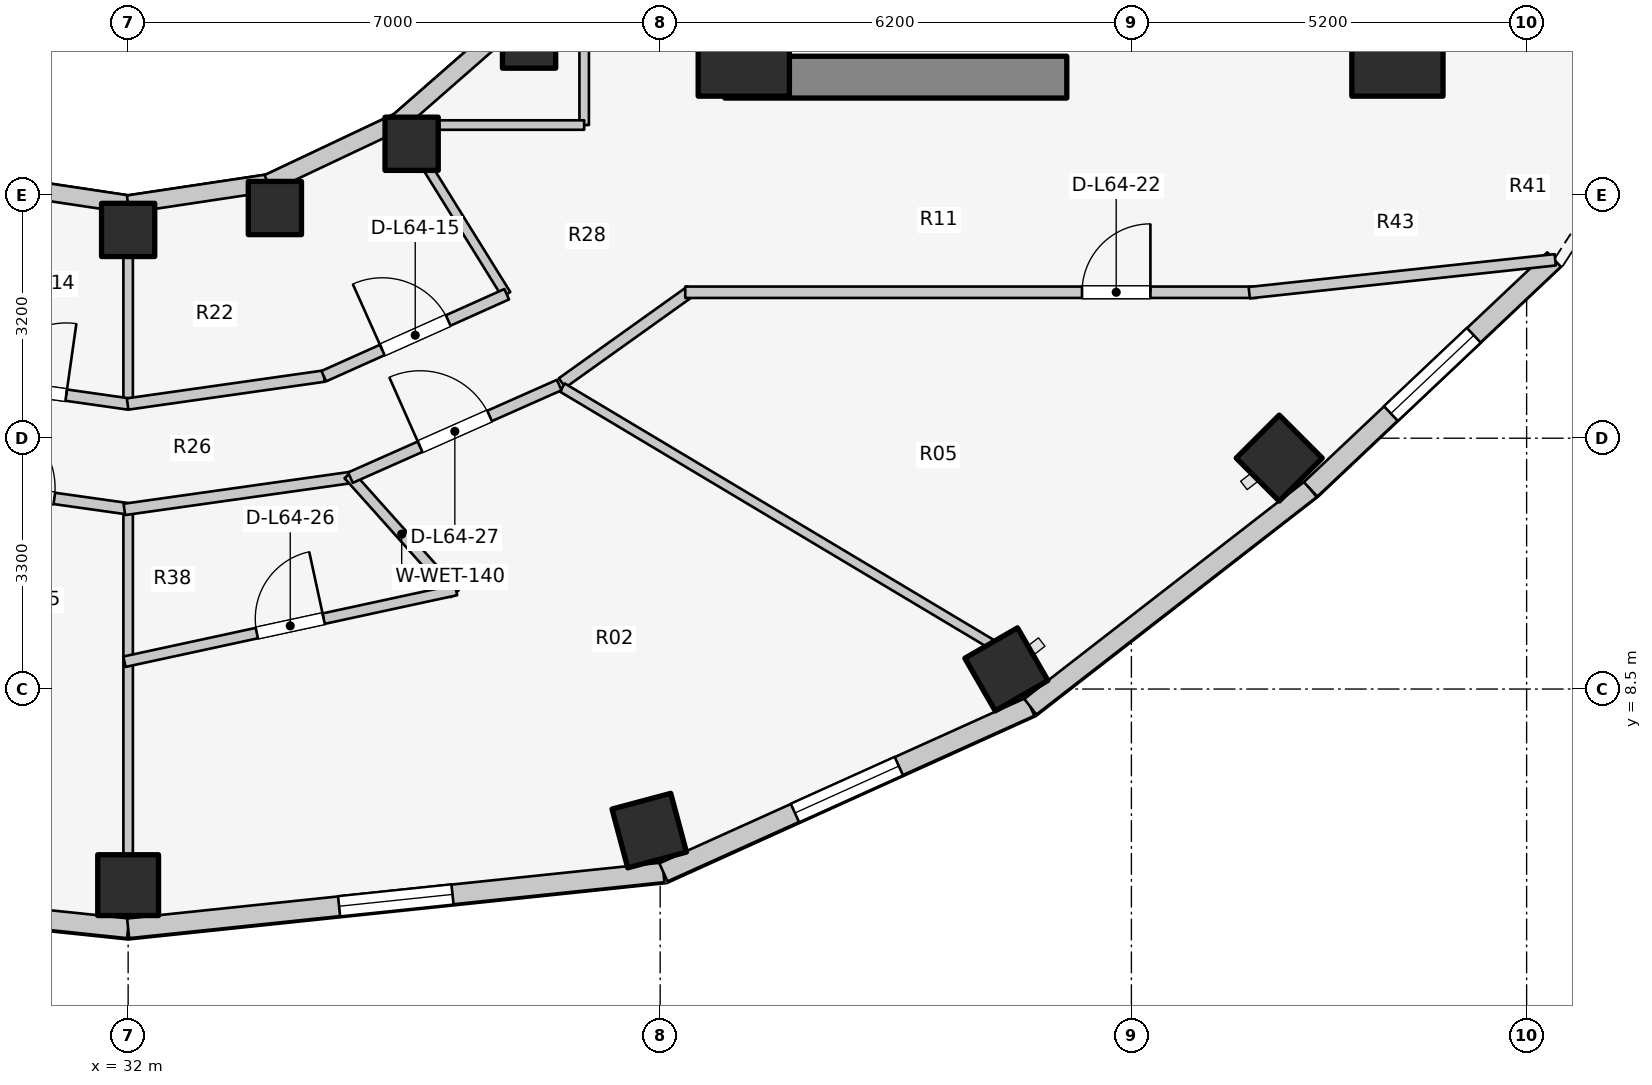
"""IFC4 building model, lengths in metres.
Left out: names, types, materials, properties, quantities, classifications, styles, units other than length and angle.
Written with IfcOpenShell. Run it as: python <this file> out.ifc"""

import sys

from ifc_helpers import new_model, si_unit, direction, frame, frame_2d, origin, origin_2d, place, context, subcontext, project, spatial, rectangle, extrude, element, fill, save


model = new_model("IFC4")
c1 = context("Model", 3, precision=1e-05, world=origin(), true_north=direction((0.0, 1.0)))
c2 = subcontext(c1, "Body", "Model", "MODEL_VIEW")
j1 = project(units=[si_unit("LENGTHUNIT", "METRE"), si_unit("PLANEANGLEUNIT", "RADIAN")], contexts=[c1])
p1 = place(None, origin())
s1 = spatial("IfcSite", under=j1, at=p1, CompositionType="ELEMENT")
p2 = place(p1, origin())
s2 = spatial("IfcBuilding", under=s1, at=p2, CompositionType="ELEMENT")
p3 = place(p2, frame((0.0, 0.0, 210.9)))
s3 = spatial("IfcBuildingStorey", under=s2, at=p3, CompositionType="ELEMENT", Elevation=210.9)
p4 = place(p3, frame((39.85, 16.55, 0.0), z_axis=(0.0, 0.0, 1.0), x_axis=(1.0, 0.0, 0.0)))
e1 = element("IfcWall", 1, at=p4, inside=s3, PredefinedType="SHEAR", context=c2, shape_type="SweptSolid", body=[
    extrude(rectangle(XDim=4.5, YDim=0.55, at=frame_2d((2.25, 0.0))), origin(), (0.0, 0.0, 1.0), 3.1),
])
for number, where, z_axis, x_axis in (
    (2, (40.1, 16.9, 0.0), (0.0, 0.0, 1.0), (1.0, 0.0, 0.0)),
    (3, (48.7, 16.9, 0.0), (0.0, 0.0, 1.0), (1.0, 0.0, 0.0)),
):
    element("IfcColumn", number, at=place(p3, frame(where, z_axis=z_axis, x_axis=x_axis)), inside=s3, PredefinedType="COLUMN", context=c2, shape_type="SweptSolid", body=[
        extrude(rectangle(XDim=1.2, YDim=1.2, at=origin_2d()), origin(), (0.0, 0.0, 1.0), 3.1),
    ])
p5 = place(p3, frame((32.0, 14.54, 0.0), z_axis=(0.0, 0.0, 1.0), x_axis=(1.0, 0.0, 0.0)))
e4 = element("IfcColumn", 4, at=p5, inside=s3, PredefinedType="COLUMN", context=c2, shape_type="SweptSolid", body=[
    extrude(rectangle(XDim=0.7, YDim=0.7, at=origin_2d()), origin(), (0.0, 0.0, 1.0), 3.1),
])
p6 = place(p3, frame((32.0, 5.92, 0.0), z_axis=(0.0, 0.0, 1.0), x_axis=(0.0, -1.0, 0.0)))
e5 = element("IfcColumn", 5, at=p6, inside=s3, PredefinedType="COLUMN", context=c2, shape_type="SweptSolid", body=[
    extrude(rectangle(XDim=0.8, YDim=0.8, at=origin_2d()), origin(), (0.0, 0.0, 1.0), 3.1),
])
p7 = place(p3, frame((33.931, 14.828, 0.0), z_axis=(0.0, 0.0, 1.0), x_axis=(1.0, 0.0, 0.0)))
e6 = element("IfcColumn", 6, at=p7, inside=s3, PredefinedType="COLUMN", context=c2, shape_type="SweptSolid", body=[
    extrude(rectangle(XDim=0.7, YDim=0.7, at=origin_2d()), origin(), (0.0, 0.0, 1.0), 3.1),
])
p8 = place(p3, frame((38.856, 6.638, 0.0), z_axis=(0.0, 0.0, 1.0), x_axis=(0.258819045103, -0.965925826289, 0.0)))
e7 = element("IfcColumn", 7, at=p8, inside=s3, PredefinedType="COLUMN", context=c2, shape_type="SweptSolid", body=[
    extrude(rectangle(XDim=0.8, YDim=0.8, at=origin_2d()), origin(), (0.0, 0.0, 1.0), 3.1),
])
p9 = place(p3, frame((35.73, 15.673, 0.0), z_axis=(0.0, 0.0, 1.0), x_axis=(1.0, 0.0, 0.0)))
e8 = element("IfcColumn", 8, at=p9, inside=s3, PredefinedType="COLUMN", context=c2, shape_type="SweptSolid", body=[
    extrude(rectangle(XDim=0.7, YDim=0.7, at=origin_2d()), origin(), (0.0, 0.0, 1.0), 3.1),
])
p10 = place(p3, frame((43.555, 8.759, 0.0), z_axis=(0.0, 0.0, 1.0), x_axis=(0.5, -0.866025403784, 0.0)))
e9 = element("IfcColumn", 9, at=p10, inside=s3, PredefinedType="COLUMN", context=c2, shape_type="SweptSolid", body=[
    extrude(rectangle(XDim=0.8, YDim=0.8, at=origin_2d()), origin(), (0.0, 0.0, 1.0), 3.1),
])
p11 = place(p3, frame((37.275, 17.018, 0.0), z_axis=(0.0, 0.0, 1.0), x_axis=(1.0, 0.0, 0.0)))
e10 = element("IfcColumn", 10, at=p11, inside=s3, PredefinedType="COLUMN", context=c2, shape_type="SweptSolid", body=[
    extrude(rectangle(XDim=0.7, YDim=0.7, at=origin_2d()), origin(), (0.0, 0.0, 1.0), 3.1),
])
p12 = place(p3, frame((47.145, 11.538, 0.0), z_axis=(0.0, 0.0, 1.0), x_axis=(0.707106781187, -0.707106781187, 0.0)))
e11 = element("IfcColumn", 11, at=p12, inside=s3, PredefinedType="COLUMN", context=c2, shape_type="SweptSolid", body=[
    extrude(rectangle(XDim=0.8, YDim=0.8, at=origin_2d()), origin(), (0.0, 0.0, 1.0), 3.1),
])
for number, where, z_axis, x_axis in (
    (12, (30.157, 15.157, 0.0), (0.0, 0.0, 1.0), (0.989, -0.149, 0.0)),
    (13, (32.0, 14.88, 0.0), (0.0, 0.0, 1.0), (0.989, 0.149, 0.0)),
):
    element("IfcWall", number, at=place(p3, frame(where, z_axis=z_axis, x_axis=x_axis)), inside=s3, PredefinedType="STANDARD", context=c2, shape_type="SweptSolid", body=[
        extrude(rectangle(XDim=1.864, YDim=0.23, at=frame_2d((0.932, 0.0))), origin(), (0.0, 0.0, 1.0), 2.16),
    ])
p13 = place(p3, frame((33.843, 15.157, 0.0), z_axis=(0.0, 0.0, 1.0), x_axis=(0.904179699603, 0.427152280606, 0.0)))
e14 = element("IfcWall", 14, at=p13, inside=s3, PredefinedType="STANDARD", context=c2, shape_type="SweptSolid", body=[
    extrude(rectangle(XDim=1.899, YDim=0.23, at=frame_2d((0.95, 0.0))), origin(), (0.0, 0.0, 1.0), 2.16),
])
p14 = place(p3, frame((35.56, 15.968, 0.0), z_axis=(0.0, 0.0, 1.0), x_axis=(0.752576694707, 0.658504607869, 0.0)))
e15 = element("IfcWall", 15, at=p14, inside=s3, PredefinedType="STANDARD", context=c2, shape_type="SweptSolid", body=[
    extrude(rectangle(XDim=1.959, YDim=0.23, at=frame_2d((0.98, 0.0))), origin(), (0.0, 0.0, 1.0), 2.16),
])
p15 = place(p3, frame((24.957, 6.088, 0.0), z_axis=(0.0, 0.0, 1.0), x_axis=(0.994582822721, -0.103947144014, 0.0)))
e16 = element("IfcWall", 16, at=p15, inside=s3, PredefinedType="STANDARD", context=c2, shape_type="SweptSolid", body=[
    extrude(rectangle(XDim=7.081, YDim=0.26, at=frame_2d((3.541, 0.0))), origin(), (0.0, 0.0, 1.0), 2.85),
])
p16 = place(p15, frame((2.341, 0.0, 0.75)))
e17 = element("IfcOpeningElement", 17, at=p16, cuts=e16, PredefinedType="OPENING", context=c2, shape_type="SweptSolid", body=[
    extrude(rectangle(XDim=2.4, YDim=1.7, at=frame_2d((1.2, 0.85))), frame((0.0, 0.14, 0.0), z_axis=(0.0, -1.0, 0.0), x_axis=(1.0, 0.0, 0.0)), (0.0, 0.0, 1.0), 0.28),
])
p17 = place(p3, frame((32.0, 5.352, 0.0), z_axis=(0.0, 0.0, 1.0), x_axis=(0.994582822721, 0.103947144014, 0.0)))
e18 = element("IfcWall", 18, at=p17, inside=s3, PredefinedType="STANDARD", context=c2, shape_type="SweptSolid", body=[
    extrude(rectangle(XDim=7.081, YDim=0.26, at=frame_2d((3.541, 0.0))), origin(), (0.0, 0.0, 1.0), 2.85),
])
p18 = place(p17, frame((2.791, 0.0, 0.75)))
e19 = element("IfcOpeningElement", 19, at=p18, cuts=e18, PredefinedType="OPENING", context=c2, shape_type="SweptSolid", body=[
    extrude(rectangle(XDim=1.5, YDim=1.6, at=frame_2d((0.75, 0.8))), frame((0.0, 0.14, 0.0), z_axis=(0.0, -1.0, 0.0), x_axis=(1.0, 0.0, 0.0)), (0.0, 0.0, 1.0), 0.28),
])
p19 = place(p3, frame((39.043, 6.088, 0.0), z_axis=(0.0, 0.0, 1.0), x_axis=(0.911427484938, 0.411460738952, 0.0)))
e20 = element("IfcWall", 20, at=p19, inside=s3, PredefinedType="STANDARD", context=c2, shape_type="SweptSolid", body=[
    extrude(rectangle(XDim=5.296, YDim=0.26, at=frame_2d((2.648, 0.0))), origin(), (0.0, 0.0, 1.0), 2.85),
])
p20 = place(p19, frame((1.898, 0.0, 0.75)))
e21 = element("IfcOpeningElement", 21, at=p20, cuts=e20, PredefinedType="OPENING", context=c2, shape_type="SweptSolid", body=[
    extrude(rectangle(XDim=1.5, YDim=1.6, at=frame_2d((0.75, 0.8))), frame((0.0, 0.14, 0.0), z_axis=(0.0, -1.0, 0.0), x_axis=(1.0, 0.0, 0.0)), (0.0, 0.0, 1.0), 0.28),
])
p21 = place(p3, frame((43.87, 8.267, 0.0), z_axis=(0.0, 0.0, 1.0), x_axis=(0.790126214723, 0.612944177563, 0.0)))
e22 = element("IfcWall", 22, at=p21, inside=s3, PredefinedType="STANDARD", context=c2, shape_type="SweptSolid", body=[
    extrude(rectangle(XDim=4.667, YDim=0.26, at=frame_2d((2.333, 0.0))), origin(), (0.0, 0.0, 1.0), 2.85),
])
p22 = place(p3, frame((47.558, 11.128, 0.0), z_axis=(0.0, 0.0, 1.0), x_axis=(0.72731899451, 0.686299555752, 0.0)))
e23 = element("IfcWall", 23, at=p22, inside=s3, PredefinedType="STANDARD", context=c2, shape_type="SweptSolid", body=[
    extrude(rectangle(XDim=4.404, YDim=0.26, at=frame_2d((2.202, 0.0))), origin(), (0.0, 0.0, 1.0), 2.85),
])
p23 = place(p22, frame((1.452, 0.0, 0.75)))
e24 = element("IfcOpeningElement", 24, at=p23, cuts=e23, PredefinedType="OPENING", context=c2, shape_type="SweptSolid", body=[
    extrude(rectangle(XDim=1.5, YDim=1.6, at=frame_2d((0.75, 0.8))), frame((0.0, 0.14, 0.0), z_axis=(0.0, -1.0, 0.0), x_axis=(1.0, 0.0, 0.0)), (0.0, 0.0, 1.0), 0.28),
])
p24 = place(p3, frame((32.0, 14.9, 0.0), z_axis=(0.0, 0.0, 1.0), x_axis=(0.0, -1.0, 0.0)))
e25 = element("IfcWall", 25, at=p24, inside=s3, PredefinedType="PARTITIONING", context=c2, shape_type="SweptSolid", body=[
    extrude(rectangle(XDim=2.65, YDim=0.125, at=frame_2d((1.325, 0.0))), origin(), (0.0, 0.0, 1.0), 2.376),
])
p25 = place(p3, frame((35.55, 15.985, 0.0), z_axis=(0.0, 0.0, 1.0), x_axis=(0.527527080983, -0.849538215049, 0.0)))
e26 = element("IfcWall", 26, at=p25, inside=s3, PredefinedType="PARTITIONING", context=c2, shape_type="SweptSolid", body=[
    extrude(rectangle(XDim=2.701, YDim=0.125, at=frame_2d((1.351, 0.0))), origin(), (0.0, 0.0, 1.0), 2.376),
])
p26 = place(p3, frame((29.423, 12.617, 0.0), z_axis=(0.0, 0.0, 1.0), x_axis=(0.990078185178, -0.140517569133, 0.0)))
e27 = element("IfcWall", 27, at=p26, inside=s3, PredefinedType="PARTITIONING", context=c2, shape_type="SweptSolid", body=[
    extrude(rectangle(XDim=2.61, YDim=0.15, at=frame_2d((1.305, 0.0))), origin(), (0.0, 0.0, 1.0), 2.376),
])
p27 = place(p26, frame((0.83, 0.0, 0.0)))
e28 = element("IfcOpeningElement", 28, at=p27, cuts=e27, PredefinedType="OPENING", context=c2, shape_type="SweptSolid", body=[
    extrude(rectangle(XDim=0.95, YDim=2.1, at=frame_2d((0.475, 1.05))), frame((0.0, 0.085, 0.0), z_axis=(0.0, -1.0, 0.0), x_axis=(1.0, 0.0, 0.0)), (0.0, 0.0, 1.0), 0.17),
])
p28 = place(p3, frame((31.993, 12.25, 0.0), z_axis=(0.0, 0.0, 1.0), x_axis=(0.990078185178, 0.140517569133, 0.0)))
e29 = element("IfcWall", 29, at=p28, inside=s3, PredefinedType="PARTITIONING", context=c2, shape_type="SweptSolid", body=[
    extrude(rectangle(XDim=2.61, YDim=0.15, at=frame_2d((1.305, 0.0))), origin(), (0.0, 0.0, 1.0), 2.376),
])
p29 = place(p3, frame((34.573, 12.616, 0.0), z_axis=(0.0, 0.0, 1.0), x_axis=(0.912628408652, 0.408790151203, 0.0)))
e30 = element("IfcWall", 30, at=p29, inside=s3, PredefinedType="PARTITIONING", context=c2, shape_type="SweptSolid", body=[
    extrude(rectangle(XDim=2.638, YDim=0.15, at=frame_2d((1.319, 0.0))), origin(), (0.0, 0.0, 1.0), 2.376),
])
p30 = place(p29, frame((0.844, 0.0, 0.0)))
e31 = element("IfcOpeningElement", 31, at=p30, cuts=e30, PredefinedType="OPENING", context=c2, shape_type="SweptSolid", body=[
    extrude(rectangle(XDim=0.95, YDim=2.1, at=frame_2d((0.475, 1.05))), frame((0.0, 0.085, 0.0), z_axis=(0.0, -1.0, 0.0), x_axis=(1.0, 0.0, 0.0)), (0.0, 0.0, 1.0), 0.17),
])
p31 = place(p3, frame((38.0, 15.92, 0.0), z_axis=(0.0, 0.0, 1.0), x_axis=(0.0, 1.0, 0.0)))
e32 = element("IfcWall", 32, at=p31, inside=s3, PredefinedType="PARTITIONING", context=c2, shape_type="SweptSolid", body=[
    extrude(rectangle(XDim=4.28, YDim=0.125, at=frame_2d((2.14, 0.0))), origin(), (0.0, 0.0, 1.0), 2.232),
])
p32 = place(p3, frame((35.4, 15.92, 0.0), z_axis=(0.0, 0.0, 1.0), x_axis=(1.0, 0.0, 0.0)))
e33 = element("IfcWall", 33, at=p32, inside=s3, PredefinedType="PARTITIONING", context=c2, shape_type="SweptSolid", body=[
    extrude(rectangle(XDim=2.6, YDim=0.125, at=frame_2d((1.3, 0.0))), origin(), (0.0, 0.0, 1.0), 2.232),
])
p33 = place(p3, frame((37.71, 12.527, 0.0), z_axis=(0.0, 0.0, 1.0), x_axis=(0.813780999276, 0.581171648669, 0.0)))
e34 = element("IfcWall", 34, at=p33, inside=s3, PredefinedType="PARTITIONING", context=c2, shape_type="SweptSolid", body=[
    extrude(rectangle(XDim=2.082, YDim=0.15, at=frame_2d((1.041, 0.0))), origin(), (0.0, 0.0, 1.0), 2.376),
])
p34 = place(p3, frame((39.33, 13.72, 0.0), z_axis=(0.0, 0.0, 1.0), x_axis=(1.0, 0.0, 0.0)))
e35 = element("IfcWall", 35, at=p34, inside=s3, PredefinedType="PARTITIONING", context=c2, shape_type="SweptSolid", body=[
    extrude(rectangle(XDim=7.52, YDim=0.15, at=frame_2d((3.76, 0.0))), origin(), (0.0, 0.0, 1.0), 2.376),
])
p35 = place(p34, frame((5.22, 0.0, 0.0)))
e36 = element("IfcOpeningElement", 36, at=p35, cuts=e35, PredefinedType="OPENING", context=c2, shape_type="SweptSolid", body=[
    extrude(rectangle(XDim=0.9, YDim=2.1, at=frame_2d((0.45, 1.05))), frame((0.0, 0.085, 0.0), z_axis=(0.0, -1.0, 0.0), x_axis=(1.0, 0.0, 0.0)), (0.0, 0.0, 1.0), 0.17),
])
p36 = place(p3, frame((46.75, 13.715, 0.0), z_axis=(0.0, 0.0, 1.0), x_axis=(0.994275802046, 0.106843949134, 0.0)))
e37 = element("IfcWall", 37, at=p36, inside=s3, PredefinedType="PARTITIONING", context=c2, shape_type="SweptSolid", body=[
    extrude(rectangle(XDim=4.049, YDim=0.15, at=frame_2d((2.024, 0.0))), origin(), (0.0, 0.0, 1.0), 2.22),
])
p37 = place(p3, frame((32.0, 10.815, 0.0), z_axis=(0.0, 0.0, 1.0), x_axis=(0.0, -1.0, 0.0)))
e38 = element("IfcWall", 38, at=p37, inside=s3, PredefinedType="PARTITIONING", context=c2, shape_type="SweptSolid", body=[
    extrude(rectangle(XDim=4.515, YDim=0.125, at=frame_2d((2.257, 0.0))), origin(), (0.0, 0.0, 1.0), 2.376),
])
p38 = place(p3, frame((37.712, 12.467, 0.0), z_axis=(0.0, 0.0, 1.0), x_axis=(0.858332411245, -0.513094018487, 0.0)))
e39 = element("IfcWall", 39, at=p38, inside=s3, PredefinedType="PARTITIONING", context=c2, shape_type="SweptSolid", body=[
    extrude(rectangle(XDim=6.586, YDim=0.125, at=frame_2d((3.293, 0.0))), origin(), (0.0, 0.0, 1.0), 2.376),
])
p39 = place(p3, frame((29.06, 11.285, 0.0), z_axis=(0.0, 0.0, 1.0), x_axis=(0.99022315503, -0.139492305317, 0.0)))
e40 = element("IfcWall", 40, at=p39, inside=s3, PredefinedType="PARTITIONING", context=c2, shape_type="SweptSolid", body=[
    extrude(rectangle(XDim=2.977, YDim=0.15, at=frame_2d((1.489, 0.0))), origin(), (0.0, 0.0, 1.0), 2.376),
])
p40 = place(p39, frame((0.989, 0.0, 0.0)))
e41 = element("IfcOpeningElement", 41, at=p40, cuts=e40, PredefinedType="OPENING", context=c2, shape_type="SweptSolid", body=[
    extrude(rectangle(XDim=1.0, YDim=2.1, at=frame_2d((0.5, 1.05))), frame((0.0, 0.085, 0.0), z_axis=(0.0, -1.0, 0.0), x_axis=(1.0, 0.0, 0.0)), (0.0, 0.0, 1.0), 0.17),
])
p41 = place(p3, frame((31.95, 10.863, 0.0), z_axis=(0.0, 0.0, 1.0), x_axis=(0.990214091671, 0.13955662885, 0.0)))
e42 = element("IfcWall", 42, at=p41, inside=s3, PredefinedType="PARTITIONING", context=c2, shape_type="SweptSolid", body=[
    extrude(rectangle(XDim=3.062, YDim=0.15, at=frame_2d((1.531, 0.0))), origin(), (0.0, 0.0, 1.0), 2.376),
])
p42 = place(p3, frame((34.899, 11.321, 0.0), z_axis=(0.0, 0.0, 1.0), x_axis=(0.66647537222, -0.745527047279, 0.0)))
e43 = element("IfcWall", 43, at=p42, inside=s3, PredefinedType="PLUMBINGWALL", context=c2, shape_type="SweptSolid", body=[
    extrude(rectangle(XDim=2.1, YDim=0.14, at=frame_2d((1.05, 0.0))), origin(), (0.0, 0.0, 1.0), 2.385),
])
p43 = place(p3, frame((31.951, 8.859, 0.0), z_axis=(0.0, 0.0, 1.0), x_axis=(0.977405310504, 0.211373742452, 0.0)))
e44 = element("IfcWall", 44, at=p43, inside=s3, PredefinedType="PLUMBINGWALL", context=c2, shape_type="SweptSolid", body=[
    extrude(rectangle(XDim=4.464, YDim=0.14, at=frame_2d((2.232, 0.0))), origin(), (0.0, 0.0, 1.0), 2.376),
])
p44 = place(p43, frame((1.782, 0.0, 0.0)))
e45 = element("IfcOpeningElement", 45, at=p44, cuts=e44, PredefinedType="OPENING", context=c2, shape_type="SweptSolid", body=[
    extrude(rectangle(XDim=0.9, YDim=2.1, at=frame_2d((0.45, 1.05))), frame((0.0, 0.08, 0.0), z_axis=(0.0, -1.0, 0.0), x_axis=(1.0, 0.0, 0.0)), (0.0, 0.0, 1.0), 0.16),
])
p45 = place(p3, frame((34.925, 11.281, 0.0), z_axis=(0.0, 0.0, 1.0), x_axis=(0.914139569865, 0.405399613724, 0.0)))
e46 = element("IfcWall", 46, at=p45, inside=s3, PredefinedType="PARTITIONING", context=c2, shape_type="SweptSolid", body=[
    extrude(rectangle(XDim=3.005, YDim=0.15, at=frame_2d((1.502, 0.0))), origin(), (0.0, 0.0, 1.0), 2.376),
])
p46 = place(p45, frame((1.002, 0.0, 0.0)))
e47 = element("IfcOpeningElement", 47, at=p46, cuts=e46, PredefinedType="OPENING", context=c2, shape_type="SweptSolid", body=[
    extrude(rectangle(XDim=1.0, YDim=2.1, at=frame_2d((0.5, 1.05))), frame((0.0, 0.085, 0.0), z_axis=(0.0, -1.0, 0.0), x_axis=(1.0, 0.0, 0.0)), (0.0, 0.0, 1.0), 0.17),
])
p47 = place(p18, origin())
e48 = element("IfcWindow", 48, at=p47, inside=s3, PartitioningType="SINGLE_PANEL", PredefinedType="WINDOW", context=c2, shape_type="SweptSolid", body=[
    extrude(rectangle(XDim=1.5, YDim=1.6, at=frame_2d((0.75, 0.8))), frame((0.0, 0.03, 0.0), z_axis=(0.0, -1.0, 0.0), x_axis=(1.0, 0.0, 0.0)), (0.0, 0.0, 1.0), 0.06),
])
fill(e19, e48)
p48 = place(p20, origin())
e49 = element("IfcWindow", 49, at=p48, inside=s3, PartitioningType="SINGLE_PANEL", PredefinedType="WINDOW", context=c2, shape_type="SweptSolid", body=[
    extrude(rectangle(XDim=1.5, YDim=1.6, at=frame_2d((0.75, 0.8))), frame((0.0, 0.03, 0.0), z_axis=(0.0, -1.0, 0.0), x_axis=(1.0, 0.0, 0.0)), (0.0, 0.0, 1.0), 0.06),
])
fill(e21, e49)
p49 = place(p23, origin())
e50 = element("IfcWindow", 50, at=p49, inside=s3, PartitioningType="SINGLE_PANEL", PredefinedType="WINDOW", context=c2, shape_type="SweptSolid", body=[
    extrude(rectangle(XDim=1.5, YDim=1.6, at=frame_2d((0.75, 0.8))), frame((0.0, 0.03, 0.0), z_axis=(0.0, -1.0, 0.0), x_axis=(1.0, 0.0, 0.0)), (0.0, 0.0, 1.0), 0.06),
])
fill(e24, e50)
p50 = place(p27, origin())
e51 = element("IfcDoor", 51, at=p50, inside=s3, OperationType="SINGLE_SWING_RIGHT", PredefinedType="DOOR", context=c2, shape_type="SweptSolid", body=[
    extrude(rectangle(XDim=0.95, YDim=2.1, at=frame_2d((0.475, 1.05))), frame((0.0, 0.025, 0.0), z_axis=(0.0, -1.0, 0.0), x_axis=(1.0, 0.0, 0.0)), (0.0, 0.0, 1.0), 0.05),
])
fill(e28, e51)
p51 = place(p30, origin())
e52 = element("IfcDoor", 52, at=p51, inside=s3, OperationType="SINGLE_SWING_LEFT", PredefinedType="DOOR", context=c2, shape_type="SweptSolid", body=[
    extrude(rectangle(XDim=0.95, YDim=2.1, at=frame_2d((0.475, 1.05))), frame((0.0, 0.025, 0.0), z_axis=(0.0, -1.0, 0.0), x_axis=(1.0, 0.0, 0.0)), (0.0, 0.0, 1.0), 0.05),
])
fill(e31, e52)
p52 = place(p35, origin())
e53 = element("IfcDoor", 53, at=p52, inside=s3, OperationType="SINGLE_SWING_RIGHT", PredefinedType="DOOR", context=c2, shape_type="SweptSolid", body=[
    extrude(rectangle(XDim=0.9, YDim=2.1, at=frame_2d((0.45, 1.05))), frame((0.0, 0.025, 0.0), z_axis=(0.0, -1.0, 0.0), x_axis=(1.0, 0.0, 0.0)), (0.0, 0.0, 1.0), 0.05),
])
fill(e36, e53)
p53 = place(p40, origin())
e54 = element("IfcDoor", 54, at=p53, inside=s3, OperationType="SINGLE_SWING_LEFT", PredefinedType="DOOR", context=c2, shape_type="SweptSolid", body=[
    extrude(rectangle(XDim=1.0, YDim=2.1, at=frame_2d((0.5, 1.05))), frame((0.0, 0.025, 0.0), z_axis=(0.0, -1.0, 0.0), x_axis=(1.0, 0.0, 0.0)), (0.0, 0.0, 1.0), 0.05),
])
fill(e41, e54)
p54 = place(p44, origin())
e55 = element("IfcDoor", 55, at=p54, inside=s3, OperationType="SINGLE_SWING_RIGHT", PredefinedType="DOOR", context=c2, shape_type="SweptSolid", body=[
    extrude(rectangle(XDim=0.9, YDim=2.1, at=frame_2d((0.45, 1.05))), frame((0.0, 0.025, 0.0), z_axis=(0.0, -1.0, 0.0), x_axis=(1.0, 0.0, 0.0)), (0.0, 0.0, 1.0), 0.05),
])
fill(e45, e55)
p55 = place(p46, origin())
e56 = element("IfcDoor", 56, at=p55, inside=s3, OperationType="SINGLE_SWING_LEFT", PredefinedType="DOOR", context=c2, shape_type="SweptSolid", body=[
    extrude(rectangle(XDim=1.0, YDim=2.1, at=frame_2d((0.5, 1.05))), frame((0.0, 0.025, 0.0), z_axis=(0.0, -1.0, 0.0), x_axis=(1.0, 0.0, 0.0)), (0.0, 0.0, 1.0), 0.05),
])
fill(e47, e56)
save(model, sys.argv[1])
